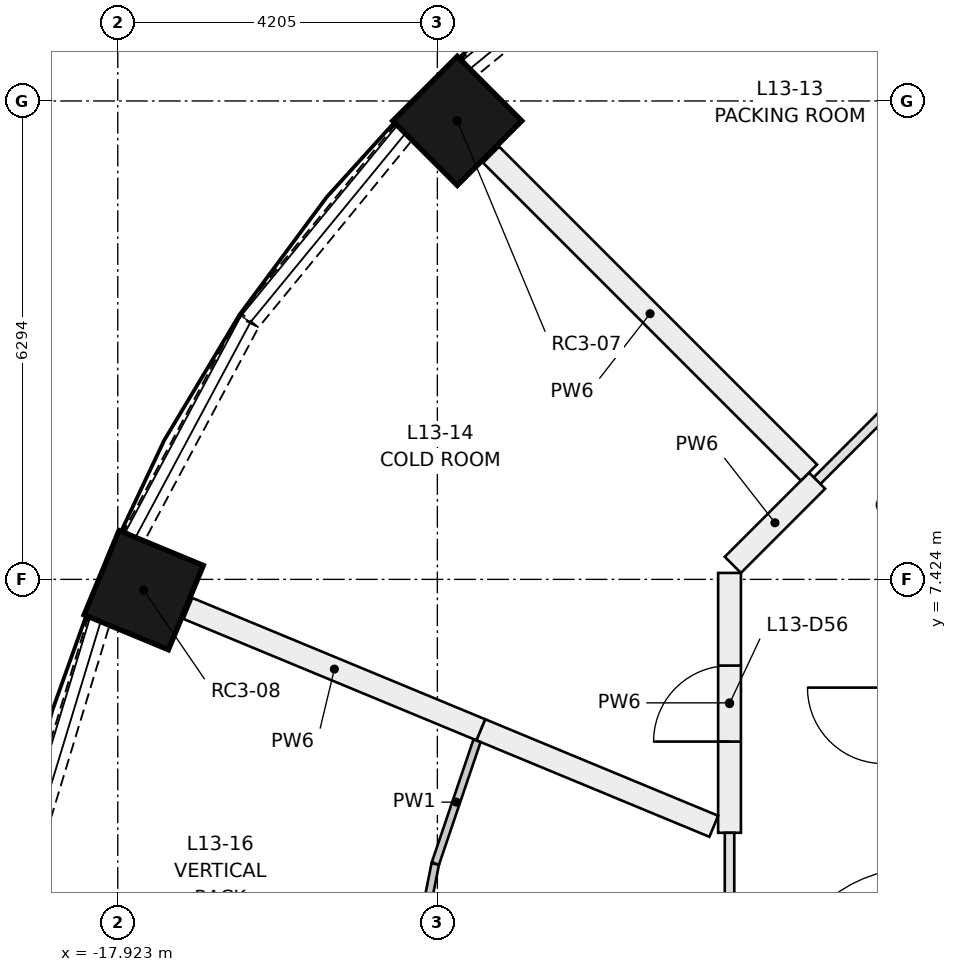
"""IFC4 building model, lengths in metres.
Left out: names, types, materials, properties, quantities, classifications, styles, units other than length and angle.
Written with IfcOpenShell. Run it as: python <this file> out.ifc"""

import sys

from ifc_helpers import new_model, si_unit, direction, frame, frame_2d, origin, origin_2d, place, context, subcontext, project, spatial, rectangle, extrude, element, fill, save


model = new_model("IFC4")
c1 = context("Model", 3, precision=1e-05, world=origin(), true_north=direction((0.0, 1.0)))
c2 = subcontext(c1, "Body", "Model", "MODEL_VIEW")
j1 = project(units=[si_unit("LENGTHUNIT", "METRE"), si_unit("PLANEANGLEUNIT", "RADIAN")], contexts=[c1])
p1 = place(None, origin())
s1 = spatial("IfcSite", under=j1, at=p1, CompositionType="ELEMENT")
p2 = place(p1, origin())
s2 = spatial("IfcBuilding", under=s1, at=p2, CompositionType="ELEMENT")
p3 = place(p2, frame((0.0, 0.0, 51.75)))
s3 = spatial("IfcBuildingStorey", under=s2, at=p3, CompositionType="ELEMENT", Elevation=51.75)
for number, where, z_axis, x_axis in (
    (1, (-13.456, 13.456, 0.0), (0.0, 0.0, 1.0), (-0.707, 0.707, 0.0)),
    (2, (-17.582, 7.282, 0.0), (0.0, 0.0, 1.0), (-0.924, 0.383, 0.0)),
):
    element("IfcColumn", number, at=place(p3, frame(where, z_axis=z_axis, x_axis=x_axis)), inside=s3, PredefinedType="COLUMN", context=c2, shape_type="SweptSolid", body=[
        extrude(rectangle(XDim=1.2, YDim=1.2, at=origin_2d()), origin(), (0.0, 0.0, 1.0), 3.65),
    ])
for number, where, z_axis, x_axis in (
    (3, (-10.833, 16.188, 0.0), (0.0, 0.0, 1.0), (-0.773, -0.634, 0.0)),
    (4, (-14.166, 13.298, 0.0), (0.0, 0.0, 1.0), (-0.634, -0.773, 0.0)),
):
    element("IfcWall", number, at=place(p3, frame(where, z_axis=z_axis, x_axis=x_axis)), inside=s3, PredefinedType="SOLIDWALL", context=c2, shape_type="SweptSolid", body=[
        extrude(rectangle(XDim=3.188, YDim=0.3, at=frame_2d((1.594, 0.0))), origin(), (0.0, 0.0, 1.0), 0.9),
    ])
p4 = place(p3, frame((-16.204, 10.809, 0.0), z_axis=(0.0, 0.0, 1.0), x_axis=(-0.471260138764, -0.881994263934, 0.0)))
e5 = element("IfcWall", 5, at=p4, inside=s3, PredefinedType="SOLIDWALL", context=c2, shape_type="SweptSolid", body=[
    extrude(rectangle(XDim=3.187, YDim=0.3, at=frame_2d((1.593, 0.0))), origin(), (0.0, 0.0, 1.0), 0.9),
])
p5 = place(p3, frame((-18.175, 6.865, 0.0), z_axis=(0.0, 0.0, 1.0), x_axis=(-0.290585541792, -0.956849017819, 0.0)))
e6 = element("IfcWall", 6, at=p5, inside=s3, PredefinedType="SOLIDWALL", context=c2, shape_type="SweptSolid", body=[
    extrude(rectangle(XDim=3.188, YDim=0.3, at=frame_2d((1.594, 0.0))), origin(), (0.0, 0.0, 1.0), 0.9),
])
p6 = place(p3, frame((-8.722, 8.722, 0.0), z_axis=(0.0, 0.0, 1.0), x_axis=(0.707030604857, 0.70718294931, 0.0)))
e7 = element("IfcWall", 7, at=p6, inside=s3, PredefinedType="PARTITIONING", context=c2, shape_type="SweptSolid", body=[
    extrude(rectangle(XDim=1.603, YDim=0.125, at=frame_2d((0.801, 0.0))), origin(), (0.0, 0.0, 1.0), 3.3),
])
p7 = place(p3, frame((-9.874, 4.09, 0.0), z_axis=(0.0, 0.0, 1.0), x_axis=(0.0, 1.0, 0.0)))
e8 = element("IfcWall", 8, at=p7, inside=s3, PredefinedType="PARTITIONING", context=c2, shape_type="SweptSolid", body=[
    extrude(rectangle(XDim=3.419, YDim=0.3, at=frame_2d((1.709, 0.0))), origin(), (0.0, 0.0, 1.0), 3.3),
])
p8 = place(p7, frame((1.2, 0.0, 0.0)))
e9 = element("IfcOpeningElement", 9, at=p8, cuts=e8, PredefinedType="OPENING", context=c2, shape_type="SweptSolid", body=[
    extrude(rectangle(XDim=1.0, YDim=2.1, at=frame_2d((0.5, 1.05))), frame((0.0, 0.16, 0.0), z_axis=(0.0, -1.0, 0.0), x_axis=(1.0, 0.0, 0.0)), (0.0, 0.0, 1.0), 0.32),
])
p9 = place(p3, frame((-9.83, 7.615, 0.0), z_axis=(0.0, 0.0, 1.0), x_axis=(0.70718471217, 0.707028841614, 0.0)))
e10 = element("IfcWall", 10, at=p9, inside=s3, PredefinedType="PARTITIONING", context=c2, shape_type="SweptSolid", body=[
    extrude(rectangle(XDim=1.566, YDim=0.3, at=frame_2d((0.783, 0.0))), origin(), (0.0, 0.0, 1.0), 3.3),
])
p10 = place(p3, frame((-9.874, 0.0, 0.0), z_axis=(0.0, 0.0, 1.0), x_axis=(0.0, 1.0, 0.0)))
e11 = element("IfcWall", 11, at=p10, inside=s3, PredefinedType="PARTITIONING", context=c2, shape_type="SweptSolid", body=[
    extrude(rectangle(XDim=4.09, YDim=0.125, at=frame_2d((2.045, 0.0))), origin(), (0.0, 0.0, 1.0), 3.3),
])
p11 = place(p10, frame((1.5, 0.0, 0.0)))
e12 = element("IfcOpeningElement", 12, at=p11, cuts=e11, PredefinedType="OPENING", context=c2, shape_type="SweptSolid", body=[
    extrude(rectangle(XDim=1.0, YDim=2.1, at=frame_2d((0.5, 1.05))), frame((0.0, 0.073, 0.0), z_axis=(0.0, -1.0, 0.0), x_axis=(1.0, 0.0, 0.0)), (0.0, 0.0, 1.0), 0.145),
])
p12 = place(p3, frame((-8.829, 8.829, 0.0), z_axis=(0.0, 0.0, 1.0), x_axis=(-0.707106781187, 0.707106781187, 0.0)))
e13 = element("IfcWall", 13, at=p12, inside=s3, PredefinedType="PARTITIONING", context=c2, shape_type="SweptSolid", body=[
    extrude(rectangle(XDim=5.914, YDim=0.3, at=frame_2d((2.957, 0.0))), origin(), (0.0, 0.0, 1.0), 3.3),
])
p13 = place(p3, frame((-10.081, 4.176, 0.0), z_axis=(0.0, 0.0, 1.0), x_axis=(-0.923876033225, 0.382691880281, 0.0)))
e14 = element("IfcWall", 14, at=p13, inside=s3, PredefinedType="PARTITIONING", context=c2, shape_type="SweptSolid", body=[
    extrude(rectangle(XDim=3.318, YDim=0.3, at=frame_2d((1.659, 0.0))), origin(), (0.0, 0.0, 1.0), 3.3),
])
p14 = place(p3, frame((-13.147, 5.446, 0.0), z_axis=(0.0, 0.0, 1.0), x_axis=(-0.923873410436, 0.382698212028, 0.0)))
e15 = element("IfcWall", 15, at=p14, inside=s3, PredefinedType="PARTITIONING", context=c2, shape_type="SweptSolid", body=[
    extrude(rectangle(XDim=4.17, YDim=0.3, at=frame_2d((2.085, 0.0))), origin(), (0.0, 0.0, 1.0), 3.3),
])
p15 = place(p3, frame((-14.108, 1.861, 0.0), z_axis=(0.0, 0.0, 1.0), x_axis=(0.195204777565, 0.980762506836, 0.0)))
e16 = element("IfcWall", 16, at=p15, inside=s3, PredefinedType="PARTITIONING", context=c2, shape_type="SweptSolid", body=[
    extrude(rectangle(XDim=1.855, YDim=0.1, at=frame_2d((0.927, 0.0))), origin(), (0.0, 0.0, 1.0), 3.3),
])
p16 = place(p3, frame((-13.744, 3.686, 0.0), z_axis=(0.0, 0.0, 1.0), x_axis=(0.321250473512, 0.946994262532, 0.0)))
e17 = element("IfcWall", 17, at=p16, inside=s3, PredefinedType="PARTITIONING", context=c2, shape_type="SweptSolid", body=[
    extrude(rectangle(XDim=1.705, YDim=0.1, at=frame_2d((0.852, 0.0))), origin(), (0.0, 0.0, 1.0), 3.3),
])
p17 = place(p8, origin())
e18 = element("IfcDoor", 18, at=p17, inside=s3, OperationType="SINGLE_SWING_LEFT", PredefinedType="DOOR", context=c2, shape_type="SweptSolid", body=[
    extrude(rectangle(XDim=1.0, YDim=2.1, at=frame_2d((0.5, 1.05))), frame((0.0, 0.025, 0.0), z_axis=(0.0, -1.0, 0.0), x_axis=(1.0, 0.0, 0.0)), (0.0, 0.0, 1.0), 0.05),
])
fill(e9, e18)
save(model, sys.argv[1])
